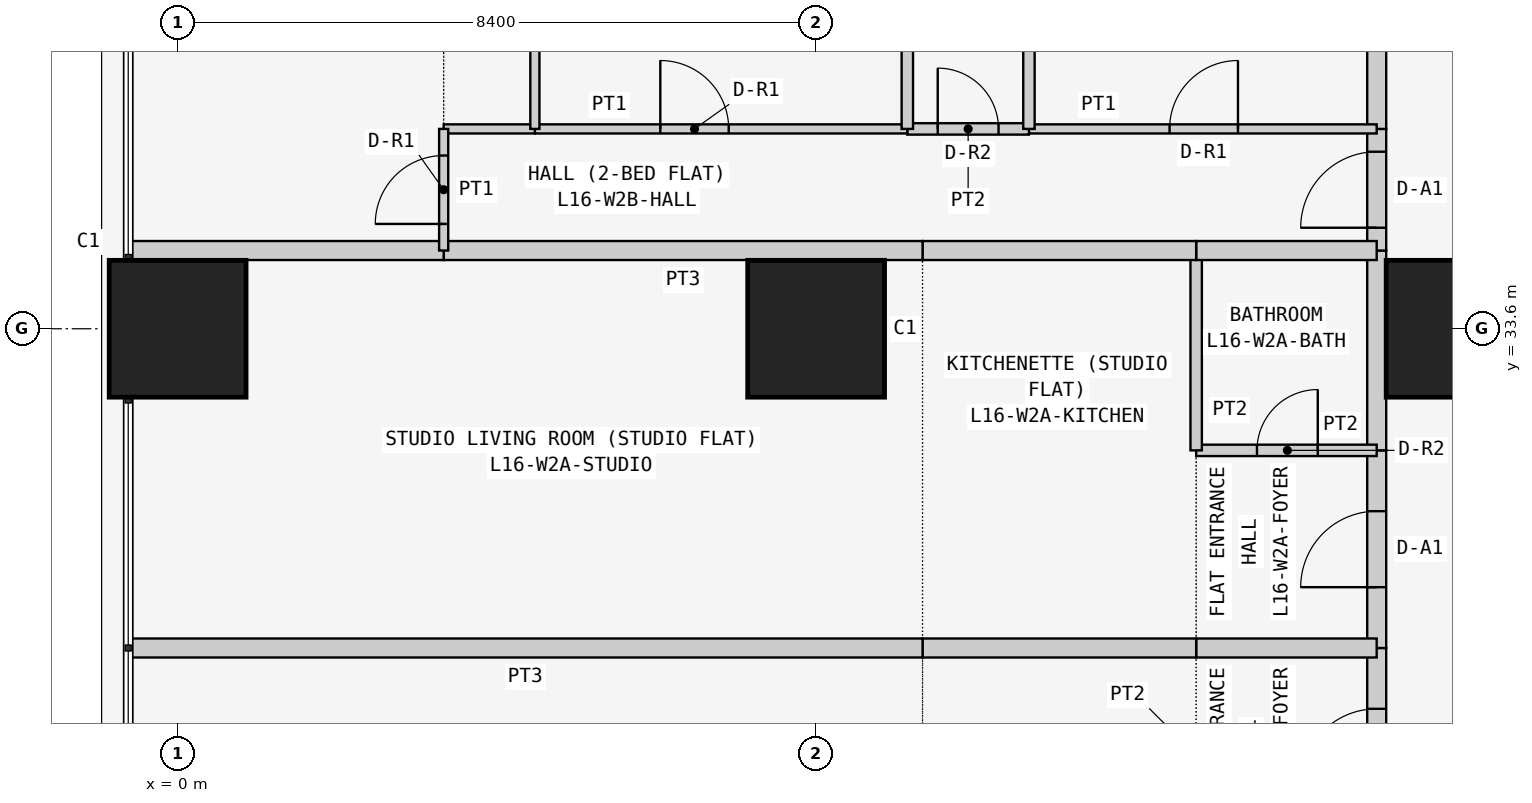
"""IFC4 building model, lengths in metres.
Left out: names, types, materials, properties, quantities, classifications, styles, units other than length and angle.
Written with IfcOpenShell. Run it as: python <this file> out.ifc"""

import sys

from ifc_helpers import new_model, si_unit, direction, frame, frame_2d, origin, origin_2d, place, context, subcontext, project, spatial, rectangle, extrude, element, fill, save


model = new_model("IFC4")
c1 = context("Model", 3, precision=1e-05, world=origin(), true_north=direction((0.0, 1.0)))
c2 = subcontext(c1, "Body", "Model", "MODEL_VIEW")
j1 = project(units=[si_unit("LENGTHUNIT", "METRE"), si_unit("PLANEANGLEUNIT", "RADIAN")], contexts=[c1])
p1 = place(None, origin())
s1 = spatial("IfcSite", under=j1, at=p1, CompositionType="ELEMENT")
p2 = place(p1, origin())
s2 = spatial("IfcBuilding", under=s1, at=p2, CompositionType="ELEMENT")
p3 = place(p2, frame((0.0, 0.0, 66.9)))
s3 = spatial("IfcBuildingStorey", under=s2, at=p3, CompositionType="ELEMENT", Elevation=66.9)
for number, where, z_axis, x_axis in (
    (1, (0.0, 33.6, 0.0), (0.0, 0.0, 1.0), (1.0, 0.0, 0.0)),
    (2, (8.4, 33.6, 0.0), (0.0, 0.0, 1.0), (1.0, 0.0, 0.0)),
    (3, (16.8, 33.6, 0.0), (0.0, 0.0, 1.0), (1.0, 0.0, 0.0)),
):
    element("IfcColumn", number, at=place(p3, frame(where, z_axis=z_axis, x_axis=x_axis)), inside=s3, PredefinedType="COLUMN", context=c2, shape_type="SweptSolid", body=[
        extrude(rectangle(XDim=1.8, YDim=1.8, at=origin_2d()), origin(), (0.0, 0.0, 1.0), 3.6),
    ])
p4 = place(p3, frame((15.775, 26.8, 0.0), z_axis=(0.0, 0.0, 1.0), x_axis=(0.0, 1.0, 0.0)))
e4 = element("IfcWall", 4, at=p4, inside=s3, PredefinedType="PARTITIONING", context=c2, shape_type="SweptSolid", body=[
    extrude(rectangle(XDim=2.6, YDim=0.25, at=frame_2d((1.3, 0.0))), origin(), (0.0, 0.0, 1.0), 3.45),
])
p5 = place(p4, frame((0.8, 0.0, 0.0)))
e5 = element("IfcOpeningElement", 5, at=p5, cuts=e4, PredefinedType="OPENING", context=c2, shape_type="SweptSolid", body=[
    extrude(rectangle(XDim=1.0, YDim=2.1, at=frame_2d((0.5, 1.05))), frame((0.0, 0.135, 0.0), z_axis=(0.0, -1.0, 0.0), x_axis=(1.0, 0.0, 0.0)), (0.0, 0.0, 1.0), 0.27),
])
p6 = place(p3, frame((15.775, 29.4, 0.0), z_axis=(0.0, 0.0, 1.0), x_axis=(0.0, 1.0, 0.0)))
e6 = element("IfcWall", 6, at=p6, inside=s3, PredefinedType="PARTITIONING", context=c2, shape_type="SweptSolid", body=[
    extrude(rectangle(XDim=2.6, YDim=0.25, at=frame_2d((1.3, 0.0))), origin(), (0.0, 0.0, 1.0), 3.45),
])
p7 = place(p6, frame((0.8, 0.0, 0.0)))
e7 = element("IfcOpeningElement", 7, at=p7, cuts=e6, PredefinedType="OPENING", context=c2, shape_type="SweptSolid", body=[
    extrude(rectangle(XDim=1.0, YDim=2.1, at=frame_2d((0.5, 1.05))), frame((0.0, 0.135, 0.0), z_axis=(0.0, -1.0, 0.0), x_axis=(1.0, 0.0, 0.0)), (0.0, 0.0, 1.0), 0.27),
])
p8 = place(p3, frame((15.775, 32.0, 0.0), z_axis=(0.0, 0.0, 1.0), x_axis=(0.0, 1.0, 0.0)))
e8 = element("IfcWall", 8, at=p8, inside=s3, PredefinedType="PARTITIONING", context=c2, shape_type="SweptSolid", body=[
    extrude(rectangle(XDim=2.629, YDim=0.25, at=frame_2d((1.314, 0.0))), origin(), (0.0, 0.0, 1.0), 3.45),
])
p9 = place(p3, frame((15.775, 34.629, 0.0), z_axis=(0.0, 0.0, 1.0), x_axis=(0.0, 1.0, 0.0)))
e9 = element("IfcWall", 9, at=p9, inside=s3, PredefinedType="PARTITIONING", context=c2, shape_type="SweptSolid", body=[
    extrude(rectangle(XDim=1.6, YDim=0.25, at=frame_2d((0.8, 0.0))), origin(), (0.0, 0.0, 1.0), 3.45),
])
p10 = place(p9, frame((0.3, 0.0, 0.0)))
e10 = element("IfcOpeningElement", 10, at=p10, cuts=e9, PredefinedType="OPENING", context=c2, shape_type="SweptSolid", body=[
    extrude(rectangle(XDim=1.0, YDim=2.1, at=frame_2d((0.5, 1.05))), frame((0.0, 0.135, 0.0), z_axis=(0.0, -1.0, 0.0), x_axis=(1.0, 0.0, 0.0)), (0.0, 0.0, 1.0), 0.27),
])
p11 = place(p3, frame((15.775, 36.229, 0.0), z_axis=(0.0, 0.0, 1.0), x_axis=(0.0, 1.0, 0.0)))
e11 = element("IfcWall", 11, at=p11, inside=s3, PredefinedType="PARTITIONING", context=c2, shape_type="SweptSolid", body=[
    extrude(rectangle(XDim=6.471, YDim=0.25, at=frame_2d((3.235, 0.0))), origin(), (0.0, 0.0, 1.0), 3.45),
])
p12 = place(p3, frame((15.775, 29.4, 0.0), z_axis=(0.0, 0.0, 1.0), x_axis=(-1.0, 0.0, 0.0)))
e12 = element("IfcWall", 12, at=p12, inside=s3, PredefinedType="PARTITIONING", context=c2, shape_type="SweptSolid", body=[
    extrude(rectangle(XDim=2.375, YDim=0.25, at=frame_2d((1.188, 0.0))), origin(), (0.0, 0.0, 1.0), 3.45),
])
p13 = place(p3, frame((13.4, 29.4, 0.0), z_axis=(0.0, 0.0, 1.0), x_axis=(-1.0, 0.0, 0.0)))
e13 = element("IfcWall", 13, at=p13, inside=s3, PredefinedType="PARTITIONING", context=c2, shape_type="SweptSolid", body=[
    extrude(rectangle(XDim=3.6, YDim=0.25, at=frame_2d((1.8, 0.0))), origin(), (0.0, 0.0, 1.0), 3.45),
])
p14 = place(p3, frame((9.8, 29.4, 0.0), z_axis=(0.0, 0.0, 1.0), x_axis=(-1.0, 0.0, 0.0)))
e14 = element("IfcWall", 14, at=p14, inside=s3, PredefinedType="PARTITIONING", context=c2, shape_type="SweptSolid", body=[
    extrude(rectangle(XDim=10.45, YDim=0.25, at=frame_2d((5.225, 0.0))), origin(), (0.0, 0.0, 1.0), 3.45),
])
p15 = place(p3, frame((13.4, 32.0, 0.0), z_axis=(0.0, 0.0, 1.0), x_axis=(1.0, 0.0, 0.0)))
e15 = element("IfcWall", 15, at=p15, inside=s3, PredefinedType="PARTITIONING", context=c2, shape_type="SweptSolid", body=[
    extrude(rectangle(XDim=2.375, YDim=0.15, at=frame_2d((1.188, 0.0))), origin(), (0.0, 0.0, 1.0), 3.45),
])
p16 = place(p15, frame((0.8, 0.0, 0.0)))
e16 = element("IfcOpeningElement", 16, at=p16, cuts=e15, PredefinedType="OPENING", context=c2, shape_type="SweptSolid", body=[
    extrude(rectangle(XDim=0.8, YDim=2.1, at=frame_2d((0.4, 1.05))), frame((0.0, 0.085, 0.0), z_axis=(0.0, -1.0, 0.0), x_axis=(1.0, 0.0, 0.0)), (0.0, 0.0, 1.0), 0.17),
])
p17 = place(p3, frame((13.4, 32.0, 0.0), z_axis=(0.0, 0.0, 1.0), x_axis=(0.0, 1.0, 0.0)))
e17 = element("IfcWall", 17, at=p17, inside=s3, PredefinedType="PARTITIONING", context=c2, shape_type="SweptSolid", body=[
    extrude(rectangle(XDim=2.629, YDim=0.15, at=frame_2d((1.314, 0.0))), origin(), (0.0, 0.0, 1.0), 3.45),
])
p18 = place(p3, frame((13.4, 34.629, 0.0), z_axis=(0.0, 0.0, 1.0), x_axis=(1.0, 0.0, 0.0)))
e18 = element("IfcWall", 18, at=p18, inside=s3, PredefinedType="PARTITIONING", context=c2, shape_type="SweptSolid", body=[
    extrude(rectangle(XDim=2.375, YDim=0.25, at=frame_2d((1.188, 0.0))), origin(), (0.0, 0.0, 1.0), 3.45),
])
p19 = place(p3, frame((9.8, 34.629, 0.0), z_axis=(0.0, 0.0, 1.0), x_axis=(1.0, 0.0, 0.0)))
e19 = element("IfcWall", 19, at=p19, inside=s3, PredefinedType="PARTITIONING", context=c2, shape_type="SweptSolid", body=[
    extrude(rectangle(XDim=3.6, YDim=0.25, at=frame_2d((1.8, 0.0))), origin(), (0.0, 0.0, 1.0), 3.45),
])
p20 = place(p3, frame((3.5, 34.629, 0.0), z_axis=(0.0, 0.0, 1.0), x_axis=(1.0, 0.0, 0.0)))
e20 = element("IfcWall", 20, at=p20, inside=s3, PredefinedType="PARTITIONING", context=c2, shape_type="SweptSolid", body=[
    extrude(rectangle(XDim=6.3, YDim=0.25, at=frame_2d((3.15, 0.0))), origin(), (0.0, 0.0, 1.0), 3.45),
])
p21 = place(p3, frame((-0.65, 34.629, 0.0), z_axis=(0.0, 0.0, 1.0), x_axis=(1.0, 0.0, 0.0)))
e21 = element("IfcWall", 21, at=p21, inside=s3, PredefinedType="PARTITIONING", context=c2, shape_type="SweptSolid", body=[
    extrude(rectangle(XDim=4.15, YDim=0.25, at=frame_2d((2.075, 0.0))), origin(), (0.0, 0.0, 1.0), 3.45),
])
p22 = place(p3, frame((11.2, 36.229, 0.0), z_axis=(0.0, 0.0, 1.0), x_axis=(1.0, 0.0, 0.0)))
e22 = element("IfcWall", 22, at=p22, inside=s3, PredefinedType="PARTITIONING", context=c2, shape_type="SweptSolid", body=[
    extrude(rectangle(XDim=4.575, YDim=0.12, at=frame_2d((2.288, 0.0))), origin(), (0.0, 0.0, 1.0), 3.45),
])
p23 = place(p22, frame((1.85, 0.0, 0.0)))
e23 = element("IfcOpeningElement", 23, at=p23, cuts=e22, PredefinedType="OPENING", context=c2, shape_type="SweptSolid", body=[
    extrude(rectangle(XDim=0.9, YDim=2.1, at=frame_2d((0.45, 1.05))), frame((0.0, 0.07, 0.0), z_axis=(0.0, -1.0, 0.0), x_axis=(1.0, 0.0, 0.0)), (0.0, 0.0, 1.0), 0.14),
])
p24 = place(p3, frame((9.6, 36.229, 0.0), z_axis=(0.0, 0.0, 1.0), x_axis=(1.0, 0.0, 0.0)))
e24 = element("IfcWall", 24, at=p24, inside=s3, PredefinedType="PARTITIONING", context=c2, shape_type="SweptSolid", body=[
    extrude(rectangle(XDim=1.6, YDim=0.15, at=frame_2d((0.8, 0.0))), origin(), (0.0, 0.0, 1.0), 3.45),
])
p25 = place(p24, frame((0.4, 0.0, 0.0)))
e25 = element("IfcOpeningElement", 25, at=p25, cuts=e24, PredefinedType="OPENING", context=c2, shape_type="SweptSolid", body=[
    extrude(rectangle(XDim=0.8, YDim=2.1, at=frame_2d((0.4, 1.05))), frame((0.0, 0.085, 0.0), z_axis=(0.0, -1.0, 0.0), x_axis=(1.0, 0.0, 0.0)), (0.0, 0.0, 1.0), 0.17),
])
p26 = place(p3, frame((4.7, 36.229, 0.0), z_axis=(0.0, 0.0, 1.0), x_axis=(1.0, 0.0, 0.0)))
e26 = element("IfcWall", 26, at=p26, inside=s3, PredefinedType="PARTITIONING", context=c2, shape_type="SweptSolid", body=[
    extrude(rectangle(XDim=4.9, YDim=0.12, at=frame_2d((2.45, 0.0))), origin(), (0.0, 0.0, 1.0), 3.45),
])
p27 = place(p26, frame((1.65, 0.0, 0.0)))
e27 = element("IfcOpeningElement", 27, at=p27, cuts=e26, PredefinedType="OPENING", context=c2, shape_type="SweptSolid", body=[
    extrude(rectangle(XDim=0.9, YDim=2.1, at=frame_2d((0.45, 1.05))), frame((0.0, 0.07, 0.0), z_axis=(0.0, -1.0, 0.0), x_axis=(1.0, 0.0, 0.0)), (0.0, 0.0, 1.0), 0.14),
])
p28 = place(p3, frame((3.5, 36.229, 0.0), z_axis=(0.0, 0.0, 1.0), x_axis=(1.0, 0.0, 0.0)))
e28 = element("IfcWall", 28, at=p28, inside=s3, PredefinedType="PARTITIONING", context=c2, shape_type="SweptSolid", body=[
    extrude(rectangle(XDim=1.2, YDim=0.12, at=frame_2d((0.6, 0.0))), origin(), (0.0, 0.0, 1.0), 3.45),
])
p29 = place(p3, frame((3.5, 34.629, 0.0), z_axis=(0.0, 0.0, 1.0), x_axis=(0.0, 1.0, 0.0)))
e29 = element("IfcWall", 29, at=p29, inside=s3, PredefinedType="PARTITIONING", context=c2, shape_type="SweptSolid", body=[
    extrude(rectangle(XDim=1.6, YDim=0.12, at=frame_2d((0.8, 0.0))), origin(), (0.0, 0.0, 1.0), 3.45),
])
p30 = place(p29, frame((0.35, 0.0, 0.0)))
e30 = element("IfcOpeningElement", 30, at=p30, cuts=e29, PredefinedType="OPENING", context=c2, shape_type="SweptSolid", body=[
    extrude(rectangle(XDim=0.9, YDim=2.1, at=frame_2d((0.45, 1.05))), frame((0.0, 0.07, 0.0), z_axis=(0.0, -1.0, 0.0), x_axis=(1.0, 0.0, 0.0)), (0.0, 0.0, 1.0), 0.14),
])
for number, where, z_axis, x_axis in (
    (31, (11.2, 36.229, 0.0), (0.0, 0.0, 1.0), (0.0, 1.0, 0.0)),
    (32, (9.6, 36.229, 0.0), (0.0, 0.0, 1.0), (0.0, 1.0, 0.0)),
):
    element("IfcWall", number, at=place(p3, frame(where, z_axis=z_axis, x_axis=x_axis)), inside=s3, PredefinedType="PARTITIONING", context=c2, shape_type="SweptSolid", body=[
        extrude(rectangle(XDim=6.471, YDim=0.15, at=frame_2d((3.235, 0.0))), origin(), (0.0, 0.0, 1.0), 3.45),
    ])
p31 = place(p3, frame((4.7, 36.229, 0.0), z_axis=(0.0, 0.0, 1.0), x_axis=(0.0, 1.0, 0.0)))
e33 = element("IfcWall", 33, at=p31, inside=s3, PredefinedType="PARTITIONING", context=c2, shape_type="SweptSolid", body=[
    extrude(rectangle(XDim=6.471, YDim=0.12, at=frame_2d((3.235, 0.0))), origin(), (0.0, 0.0, 1.0), 3.45),
])
p32 = place(p5, origin())
e34 = element("IfcDoor", 34, at=p32, inside=s3, OperationType="SINGLE_SWING_LEFT", PredefinedType="DOOR", context=c2, shape_type="SweptSolid", body=[
    extrude(rectangle(XDim=1.0, YDim=2.1, at=frame_2d((0.5, 1.05))), frame((0.0, 0.025, 0.0), z_axis=(0.0, -1.0, 0.0), x_axis=(1.0, 0.0, 0.0)), (0.0, 0.0, 1.0), 0.05),
])
fill(e5, e34)
p33 = place(p7, origin())
e35 = element("IfcDoor", 35, at=p33, inside=s3, OperationType="SINGLE_SWING_LEFT", PredefinedType="DOOR", context=c2, shape_type="SweptSolid", body=[
    extrude(rectangle(XDim=1.0, YDim=2.1, at=frame_2d((0.5, 1.05))), frame((0.0, 0.025, 0.0), z_axis=(0.0, -1.0, 0.0), x_axis=(1.0, 0.0, 0.0)), (0.0, 0.0, 1.0), 0.05),
])
fill(e7, e35)
p34 = place(p16, origin())
e36 = element("IfcDoor", 36, at=p34, inside=s3, OperationType="SINGLE_SWING_RIGHT", PredefinedType="DOOR", context=c2, shape_type="SweptSolid", body=[
    extrude(rectangle(XDim=0.8, YDim=2.1, at=frame_2d((0.4, 1.05))), frame((0.0, 0.025, 0.0), z_axis=(0.0, -1.0, 0.0), x_axis=(1.0, 0.0, 0.0)), (0.0, 0.0, 1.0), 0.05),
])
fill(e16, e36)
p35 = place(p10, origin())
e37 = element("IfcDoor", 37, at=p35, inside=s3, OperationType="SINGLE_SWING_LEFT", PredefinedType="DOOR", context=c2, shape_type="SweptSolid", body=[
    extrude(rectangle(XDim=1.0, YDim=2.1, at=frame_2d((0.5, 1.05))), frame((0.0, 0.025, 0.0), z_axis=(0.0, -1.0, 0.0), x_axis=(1.0, 0.0, 0.0)), (0.0, 0.0, 1.0), 0.05),
])
fill(e10, e37)
p36 = place(p23, origin())
e38 = element("IfcDoor", 38, at=p36, inside=s3, OperationType="SINGLE_SWING_RIGHT", PredefinedType="DOOR", context=c2, shape_type="SweptSolid", body=[
    extrude(rectangle(XDim=0.9, YDim=2.1, at=frame_2d((0.45, 1.05))), frame((0.0, 0.025, 0.0), z_axis=(0.0, -1.0, 0.0), x_axis=(1.0, 0.0, 0.0)), (0.0, 0.0, 1.0), 0.05),
])
fill(e23, e38)
p37 = place(p25, origin())
e39 = element("IfcDoor", 39, at=p37, inside=s3, OperationType="SINGLE_SWING_LEFT", PredefinedType="DOOR", context=c2, shape_type="SweptSolid", body=[
    extrude(rectangle(XDim=0.8, YDim=2.1, at=frame_2d((0.4, 1.05))), frame((0.0, 0.025, 0.0), z_axis=(0.0, -1.0, 0.0), x_axis=(1.0, 0.0, 0.0)), (0.0, 0.0, 1.0), 0.05),
])
fill(e25, e39)
p38 = place(p27, origin())
e40 = element("IfcDoor", 40, at=p38, inside=s3, OperationType="SINGLE_SWING_LEFT", PredefinedType="DOOR", context=c2, shape_type="SweptSolid", body=[
    extrude(rectangle(XDim=0.9, YDim=2.1, at=frame_2d((0.45, 1.05))), frame((0.0, 0.025, 0.0), z_axis=(0.0, -1.0, 0.0), x_axis=(1.0, 0.0, 0.0)), (0.0, 0.0, 1.0), 0.05),
])
fill(e27, e40)
p39 = place(p30, origin())
e41 = element("IfcDoor", 41, at=p39, inside=s3, OperationType="SINGLE_SWING_LEFT", PredefinedType="DOOR", context=c2, shape_type="SweptSolid", body=[
    extrude(rectangle(XDim=0.9, YDim=2.1, at=frame_2d((0.45, 1.05))), frame((0.0, 0.025, 0.0), z_axis=(0.0, -1.0, 0.0), x_axis=(1.0, 0.0, 0.0)), (0.0, 0.0, 1.0), 0.05),
])
fill(e30, e41)
save(model, sys.argv[1])
